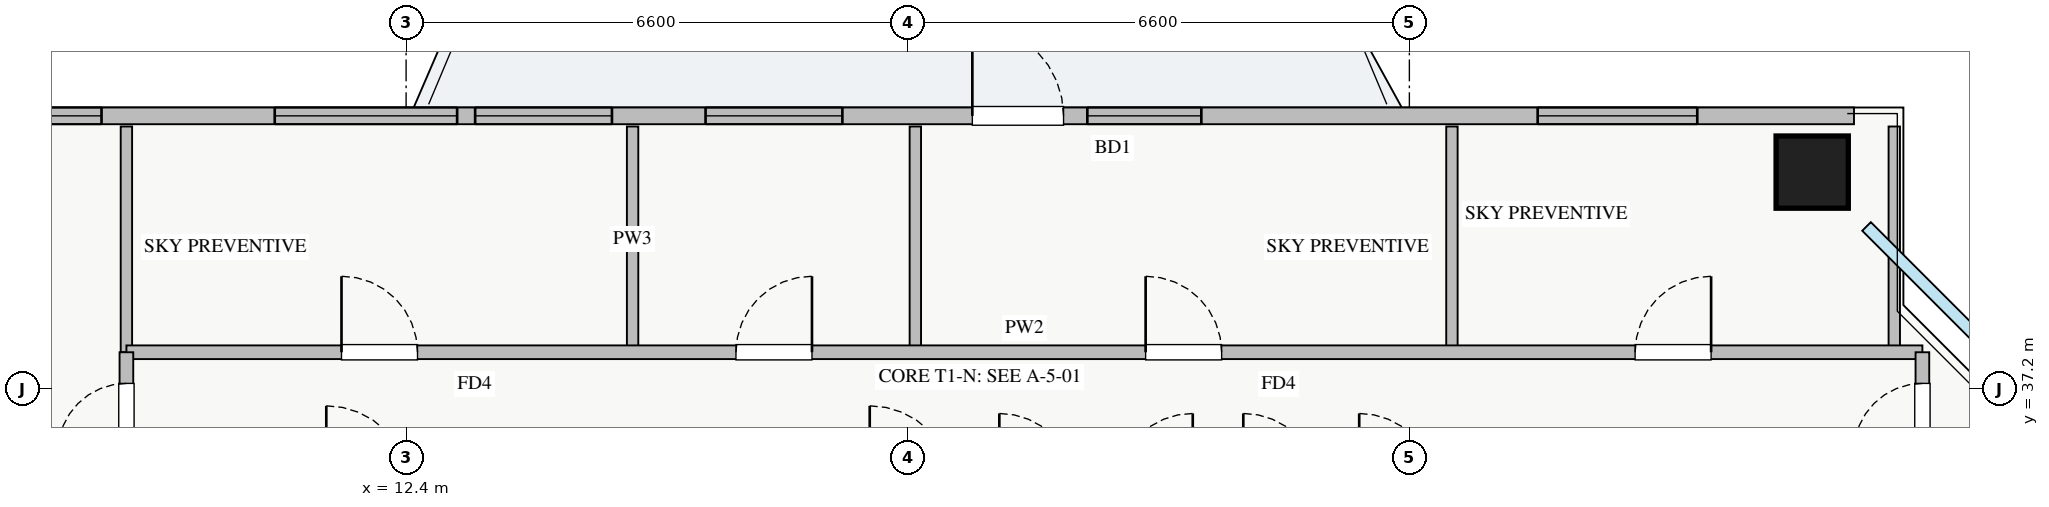
"""IFC4 building model, lengths in metres.
Left out: names, types, materials, properties, quantities, classifications, styles, units other than length and angle.
Written with IfcOpenShell. Run it as: python <this file> out.ifc"""

import sys

from ifc_helpers import new_model, si_unit, direction, frame, frame_2d, origin, origin_2d, place, context, subcontext, project, spatial, rectangle, extrude, source, transform, mapped, element, fill, save


model = new_model("IFC4")
c1 = context("Model", 3, precision=1e-05, world=origin(), true_north=direction((0.0, 1.0)))
c2 = subcontext(c1, "Body", "Model", "MODEL_VIEW")
j1 = project(units=[si_unit("LENGTHUNIT", "METRE"), si_unit("PLANEANGLEUNIT", "RADIAN")], contexts=[c1])
p1 = place(None, origin())
s1 = spatial("IfcSite", under=j1, at=p1, CompositionType="ELEMENT")
p2 = place(p1, origin())
s2 = spatial("IfcBuilding", under=s1, at=p2, CompositionType="ELEMENT")
p3 = place(p2, frame((0.0, 0.0, 182.75)))
s3 = spatial("IfcBuildingStorey", under=s2, at=p3, CompositionType="ELEMENT", Elevation=182.75)
m1 = source(origin(), c2, "Body", "SweptSolid", [
    extrude(rectangle(XDim=0.95, YDim=0.95, at=origin_2d()), origin(), (0.0, 0.0, 1.0), 3.25),
])
p4 = place(p3, frame((30.9, 40.05, 0.0), z_axis=(0.0, 0.0, 1.0), x_axis=(1.0, 0.0, 0.0)))
e1 = element("IfcColumn", 1, at=p4, inside=s3, PredefinedType="COLUMN", context=c2, shape_type="MappedRepresentation", body=[
    mapped(m1, transform((0.0, 0.0, 0.0), x_axis=(1.0, 0.0, 0.0), y_axis=(0.0, 1.0, 0.0), z_axis=(0.0, 0.0, 1.0), scale=1.0)),
])
p5 = place(p3, frame((6.55, 40.79, 0.0), z_axis=(0.0, 0.0, 1.0), x_axis=(1.0, 0.0, 0.0)))
e2 = element("IfcWall", 2, at=p5, inside=s3, PredefinedType="STANDARD", context=c2, shape_type="SweptSolid", body=[
    extrude(rectangle(XDim=24.9, YDim=0.22, at=frame_2d((12.45, 0.0))), origin(), (0.0, 0.0, 1.0), 2.57),
])
p6 = place(p5, frame((13.3, 0.0, 0.0)))
e3 = element("IfcOpeningElement", 3, at=p6, cuts=e2, PredefinedType="OPENING", context=c2, shape_type="SweptSolid", body=[
    extrude(rectangle(XDim=1.2, YDim=2.1, at=frame_2d((0.6, 1.05))), frame((0.0, 0.12, 0.0), z_axis=(0.0, -1.0, 0.0), x_axis=(1.0, 0.0, 0.0)), (0.0, 0.0, 1.0), 0.24),
])
p7 = place(p5, frame((0.343, 0.0, 0.9)))
e4 = element("IfcOpeningElement", 4, at=p7, cuts=e2, PredefinedType="OPENING", context=c2, shape_type="SweptSolid", body=[
    extrude(rectangle(XDim=1.5, YDim=1.5, at=frame_2d((0.75, 0.75))), frame((0.0, 0.12, 0.0), z_axis=(0.0, -1.0, 0.0), x_axis=(1.0, 0.0, 0.0)), (0.0, 0.0, 1.0), 0.24),
])
p8 = place(p5, frame((9.79, 0.0, 0.9)))
e5 = element("IfcOpeningElement", 5, at=p8, cuts=e2, PredefinedType="OPENING", context=c2, shape_type="SweptSolid", body=[
    extrude(rectangle(XDim=1.8, YDim=1.5, at=frame_2d((0.9, 0.75))), frame((0.0, 0.12, 0.0), z_axis=(0.0, -1.0, 0.0), x_axis=(1.0, 0.0, 0.0)), (0.0, 0.0, 1.0), 0.24),
])
p9 = place(p5, frame((14.813, 0.0, 0.9)))
e6 = element("IfcOpeningElement", 6, at=p9, cuts=e2, PredefinedType="OPENING", context=c2, shape_type="SweptSolid", body=[
    extrude(rectangle(XDim=1.5, YDim=1.45, at=frame_2d((0.75, 0.725))), frame((0.0, 0.12, 0.0), z_axis=(0.0, -1.0, 0.0), x_axis=(1.0, 0.0, 0.0)), (0.0, 0.0, 1.0), 0.24),
])
p10 = place(p5, frame((20.738, 0.0, 0.9)))
e7 = element("IfcOpeningElement", 7, at=p10, cuts=e2, PredefinedType="OPENING", context=c2, shape_type="SweptSolid", body=[
    extrude(rectangle(XDim=2.1, YDim=1.48, at=frame_2d((1.05, 0.74))), frame((0.0, 0.12, 0.0), z_axis=(0.0, -1.0, 0.0), x_axis=(1.0, 0.0, 0.0)), (0.0, 0.0, 1.0), 0.24),
])
p11 = place(p5, frame((4.122, 0.0, 0.9)))
e8 = element("IfcOpeningElement", 8, at=p11, cuts=e2, PredefinedType="OPENING", context=c2, shape_type="SweptSolid", body=[
    extrude(rectangle(XDim=2.4, YDim=1.5, at=frame_2d((1.2, 0.75))), frame((0.0, 0.12, 0.0), z_axis=(0.0, -1.0, 0.0), x_axis=(1.0, 0.0, 0.0)), (0.0, 0.0, 1.0), 0.24),
])
p12 = place(p5, frame((6.758, 0.0, 0.9)))
e9 = element("IfcOpeningElement", 9, at=p12, cuts=e2, PredefinedType="OPENING", context=c2, shape_type="SweptSolid", body=[
    extrude(rectangle(XDim=1.8, YDim=1.5, at=frame_2d((0.9, 0.75))), frame((0.0, 0.12, 0.0), z_axis=(0.0, -1.0, 0.0), x_axis=(1.0, 0.0, 0.0)), (0.0, 0.0, 1.0), 0.24),
])
p13 = place(p3, frame((15.38, 37.68, 0.0), z_axis=(0.0, 0.0, 1.0), x_axis=(0.0, 1.0, 0.0)))
e10 = element("IfcWall", 10, at=p13, inside=s3, PredefinedType="PARTITIONING", context=c2, shape_type="SweptSolid", body=[
    extrude(rectangle(XDim=2.97, YDim=0.15, at=frame_2d((1.485, 0.0))), origin(), (0.0, 0.0, 1.0), 3.03),
])
p14 = place(p3, frame((19.1, 37.68, 0.0), z_axis=(0.0, 0.0, 1.0), x_axis=(0.0, 1.0, 0.0)))
e11 = element("IfcWall", 11, at=p14, inside=s3, PredefinedType="PARTITIONING", context=c2, shape_type="SweptSolid", body=[
    extrude(rectangle(XDim=2.97, YDim=0.15, at=frame_2d((1.485, 0.0))), origin(), (0.0, 0.0, 1.0), 2.825),
])
for number, where, z_axis, x_axis in (
    (12, (26.16, 37.68, 0.0), (0.0, 0.0, 1.0), (0.0, 1.0, 0.0)),
    (13, (8.72, 37.68, 0.0), (0.0, 0.0, 1.0), (0.0, 1.0, 0.0)),
    (14, (31.98, 37.68, 0.0), (0.0, 0.0, 1.0), (0.0, 1.0, 0.0)),
):
    element("IfcWall", number, at=place(p3, frame(where, z_axis=z_axis, x_axis=x_axis)), inside=s3, PredefinedType="PARTITIONING", context=c2, shape_type="SweptSolid", body=[
        extrude(rectangle(XDim=2.97, YDim=0.15, at=frame_2d((1.485, 0.0))), origin(), (0.0, 0.0, 1.0), 3.03),
    ])
p15 = place(p3, frame((8.72, 37.68, 0.0), z_axis=(0.0, 0.0, 1.0), x_axis=(1.0, 0.0, 0.0)))
e15 = element("IfcWall", 15, at=p15, inside=s3, PredefinedType="PARTITIONING", context=c2, shape_type="SweptSolid", body=[
    extrude(rectangle(XDim=23.63, YDim=0.18, at=frame_2d((11.815, 0.0))), origin(), (0.0, 0.0, 1.0), 3.03),
])
p16 = place(p15, frame((2.83, 0.0, 0.0)))
e16 = element("IfcOpeningElement", 16, at=p16, cuts=e15, PredefinedType="OPENING", context=c2, shape_type="SweptSolid", body=[
    extrude(rectangle(XDim=1.0, YDim=2.05, at=frame_2d((0.5, 1.025))), frame((0.0, 0.1, 0.0), z_axis=(0.0, -1.0, 0.0), x_axis=(1.0, 0.0, 0.0)), (0.0, 0.0, 1.0), 0.2),
])
p17 = place(p15, frame((8.02, 0.0, 0.0)))
e17 = element("IfcOpeningElement", 17, at=p17, cuts=e15, PredefinedType="OPENING", context=c2, shape_type="SweptSolid", body=[
    extrude(rectangle(XDim=1.0, YDim=2.05, at=frame_2d((0.5, 1.025))), frame((0.0, 0.1, 0.0), z_axis=(0.0, -1.0, 0.0), x_axis=(1.0, 0.0, 0.0)), (0.0, 0.0, 1.0), 0.2),
])
p18 = place(p15, frame((13.41, 0.0, 0.0)))
e18 = element("IfcOpeningElement", 18, at=p18, cuts=e15, PredefinedType="OPENING", context=c2, shape_type="SweptSolid", body=[
    extrude(rectangle(XDim=1.0, YDim=2.05, at=frame_2d((0.5, 1.025))), frame((0.0, 0.1, 0.0), z_axis=(0.0, -1.0, 0.0), x_axis=(1.0, 0.0, 0.0)), (0.0, 0.0, 1.0), 0.2),
])
p19 = place(p15, frame((19.85, 0.0, 0.0)))
e19 = element("IfcOpeningElement", 19, at=p19, cuts=e15, PredefinedType="OPENING", context=c2, shape_type="SweptSolid", body=[
    extrude(rectangle(XDim=1.0, YDim=2.05, at=frame_2d((0.5, 1.025))), frame((0.0, 0.1, 0.0), z_axis=(0.0, -1.0, 0.0), x_axis=(1.0, 0.0, 0.0)), (0.0, 0.0, 1.0), 0.2),
])
p20 = place(p3, frame((8.72, 8.31, 0.0), z_axis=(0.0, 0.0, 1.0), x_axis=(0.0, 1.0, 0.0)))
e20 = element("IfcWall", 20, at=p20, inside=s3, PredefinedType="PARTITIONING", context=c2, shape_type="SweptSolid", body=[
    extrude(rectangle(XDim=29.37, YDim=0.18, at=frame_2d((14.685, 0.0))), origin(), (0.0, 0.0, 1.0), 3.03),
])
p21 = place(p20, frame((28.06, 0.0, 0.0)))
e21 = element("IfcOpeningElement", 21, at=p21, cuts=e20, PredefinedType="OPENING", context=c2, shape_type="SweptSolid", body=[
    extrude(rectangle(XDim=0.9, YDim=2.05, at=frame_2d((0.45, 1.025))), frame((0.0, 0.1, 0.0), z_axis=(0.0, -1.0, 0.0), x_axis=(1.0, 0.0, 0.0)), (0.0, 0.0, 1.0), 0.2),
])
p22 = place(p20, frame((0.24, 0.0, 0.0)))
e22 = element("IfcOpeningElement", 22, at=p22, cuts=e20, PredefinedType="OPENING", context=c2, shape_type="SweptSolid", body=[
    extrude(rectangle(XDim=0.9, YDim=2.05, at=frame_2d((0.45, 1.025))), frame((0.0, 0.1, 0.0), z_axis=(0.0, -1.0, 0.0), x_axis=(1.0, 0.0, 0.0)), (0.0, 0.0, 1.0), 0.2),
])
p23 = place(p20, frame((2.25, 0.0, 0.0)))
e23 = element("IfcOpeningElement", 23, at=p23, cuts=e20, PredefinedType="OPENING", context=c2, shape_type="SweptSolid", body=[
    extrude(rectangle(XDim=1.0, YDim=2.05, at=frame_2d((0.5, 1.025))), frame((0.0, 0.1, 0.0), z_axis=(0.0, -1.0, 0.0), x_axis=(1.0, 0.0, 0.0)), (0.0, 0.0, 1.0), 0.2),
])
p24 = place(p20, frame((7.935, 0.0, 0.0)))
e24 = element("IfcOpeningElement", 24, at=p24, cuts=e20, PredefinedType="OPENING", context=c2, shape_type="SweptSolid", body=[
    extrude(rectangle(XDim=1.0, YDim=2.05, at=frame_2d((0.5, 1.025))), frame((0.0, 0.1, 0.0), z_axis=(0.0, -1.0, 0.0), x_axis=(1.0, 0.0, 0.0)), (0.0, 0.0, 1.0), 0.2),
])
p25 = place(p20, frame((17.3, 0.0, 0.0)))
e25 = element("IfcOpeningElement", 25, at=p25, cuts=e20, PredefinedType="OPENING", context=c2, shape_type="SweptSolid", body=[
    extrude(rectangle(XDim=1.0, YDim=2.05, at=frame_2d((0.5, 1.025))), frame((0.0, 0.1, 0.0), z_axis=(0.0, -1.0, 0.0), x_axis=(1.0, 0.0, 0.0)), (0.0, 0.0, 1.0), 0.2),
])
p26 = place(p20, frame((21.98, 0.0, 0.0)))
e26 = element("IfcOpeningElement", 26, at=p26, cuts=e20, PredefinedType="OPENING", context=c2, shape_type="SweptSolid", body=[
    extrude(rectangle(XDim=1.0, YDim=2.05, at=frame_2d((0.5, 1.025))), frame((0.0, 0.1, 0.0), z_axis=(0.0, -1.0, 0.0), x_axis=(1.0, 0.0, 0.0)), (0.0, 0.0, 1.0), 0.2),
])
p27 = place(p3, frame((32.35, 8.31, 0.0), z_axis=(0.0, 0.0, 1.0), x_axis=(0.0, 1.0, 0.0)))
e27 = element("IfcWall", 27, at=p27, inside=s3, PredefinedType="PARTITIONING", context=c2, shape_type="SweptSolid", body=[
    extrude(rectangle(XDim=29.37, YDim=0.18, at=frame_2d((14.685, 0.0))), origin(), (0.0, 0.0, 1.0), 3.03),
])
p28 = place(p27, frame((28.06, 0.0, 0.0)))
e28 = element("IfcOpeningElement", 28, at=p28, cuts=e27, PredefinedType="OPENING", context=c2, shape_type="SweptSolid", body=[
    extrude(rectangle(XDim=0.9, YDim=2.05, at=frame_2d((0.45, 1.025))), frame((0.0, 0.1, 0.0), z_axis=(0.0, -1.0, 0.0), x_axis=(1.0, 0.0, 0.0)), (0.0, 0.0, 1.0), 0.2),
])
p29 = place(p27, frame((0.415, 0.0, 0.0)))
e29 = element("IfcOpeningElement", 29, at=p29, cuts=e27, PredefinedType="OPENING", context=c2, shape_type="SweptSolid", body=[
    extrude(rectangle(XDim=0.9, YDim=2.05, at=frame_2d((0.45, 1.025))), frame((0.0, 0.1, 0.0), z_axis=(0.0, -1.0, 0.0), x_axis=(1.0, 0.0, 0.0)), (0.0, 0.0, 1.0), 0.2),
])
p30 = place(p27, frame((3.58, 0.0, 0.0)))
e30 = element("IfcOpeningElement", 30, at=p30, cuts=e27, PredefinedType="OPENING", context=c2, shape_type="SweptSolid", body=[
    extrude(rectangle(XDim=1.0, YDim=2.05, at=frame_2d((0.5, 1.025))), frame((0.0, 0.1, 0.0), z_axis=(0.0, -1.0, 0.0), x_axis=(1.0, 0.0, 0.0)), (0.0, 0.0, 1.0), 0.2),
])
p31 = place(p27, frame((12.305, 0.0, 0.0)))
e31 = element("IfcOpeningElement", 31, at=p31, cuts=e27, PredefinedType="OPENING", context=c2, shape_type="SweptSolid", body=[
    extrude(rectangle(XDim=1.0, YDim=2.05, at=frame_2d((0.5, 1.025))), frame((0.0, 0.1, 0.0), z_axis=(0.0, -1.0, 0.0), x_axis=(1.0, 0.0, 0.0)), (0.0, 0.0, 1.0), 0.2),
])
p32 = place(p27, frame((20.835, 0.0, 0.0)))
e32 = element("IfcOpeningElement", 32, at=p32, cuts=e27, PredefinedType="OPENING", context=c2, shape_type="SweptSolid", body=[
    extrude(rectangle(XDim=1.0, YDim=2.05, at=frame_2d((0.5, 1.025))), frame((0.0, 0.1, 0.0), z_axis=(0.0, -1.0, 0.0), x_axis=(1.0, 0.0, 0.0)), (0.0, 0.0, 1.0), 0.2),
])
m2 = source(origin(), c2, "Body", "SweptSolid", [
    extrude(rectangle(XDim=1.2, YDim=2.1, at=frame_2d((0.6, 1.05))), frame((0.0, 0.025, 0.0), z_axis=(0.0, -1.0, 0.0), x_axis=(1.0, 0.0, 0.0)), (0.0, 0.0, 1.0), 0.05),
])
p33 = place(p6, origin())
e33 = element("IfcDoor", 33, at=p33, inside=s3, OperationType="SINGLE_SWING_LEFT", PredefinedType="DOOR", context=c2, shape_type="MappedRepresentation", body=[
    mapped(m2, transform((0.0, 0.0, 0.0), x_axis=(1.0, 0.0, 0.0), y_axis=(0.0, 1.0, 0.0), z_axis=(0.0, 0.0, 1.0), scale=1.0)),
])
fill(e3, e33)
m3 = source(origin(), c2, "Body", "SweptSolid", [
    extrude(rectangle(XDim=1.5, YDim=1.5, at=frame_2d((0.75, 0.75))), frame((0.0, 0.03, 0.0), z_axis=(0.0, -1.0, 0.0), x_axis=(1.0, 0.0, 0.0)), (0.0, 0.0, 1.0), 0.06),
])
p34 = place(p7, origin())
e34 = element("IfcWindow", 34, at=p34, inside=s3, PartitioningType="TRIPLE_PANEL_VERTICAL", PredefinedType="WINDOW", context=c2, shape_type="MappedRepresentation", body=[
    mapped(m3, transform((0.0, 0.0, 0.0), x_axis=(1.0, 0.0, 0.0), y_axis=(0.0, 1.0, 0.0), z_axis=(0.0, 0.0, 1.0), scale=1.0)),
])
fill(e4, e34)
m4 = source(origin(), c2, "Body", "SweptSolid", [
    extrude(rectangle(XDim=1.8, YDim=1.5, at=frame_2d((0.9, 0.75))), frame((0.0, 0.03, 0.0), z_axis=(0.0, -1.0, 0.0), x_axis=(1.0, 0.0, 0.0)), (0.0, 0.0, 1.0), 0.06),
])
p35 = place(p8, origin())
e35 = element("IfcWindow", 35, at=p35, inside=s3, PartitioningType="DOUBLE_PANEL_VERTICAL", PredefinedType="WINDOW", context=c2, shape_type="MappedRepresentation", body=[
    mapped(m4, transform((0.0, 0.0, 0.0), x_axis=(1.0, 0.0, 0.0), y_axis=(0.0, 1.0, 0.0), z_axis=(0.0, 0.0, 1.0), scale=1.0)),
])
fill(e5, e35)
m5 = source(origin(), c2, "Body", "SweptSolid", [
    extrude(rectangle(XDim=1.5, YDim=1.45, at=frame_2d((0.75, 0.725))), frame((0.0, 0.03, 0.0), z_axis=(0.0, -1.0, 0.0), x_axis=(1.0, 0.0, 0.0)), (0.0, 0.0, 1.0), 0.06),
])
p36 = place(p9, origin())
e36 = element("IfcWindow", 36, at=p36, inside=s3, PartitioningType="DOUBLE_PANEL_VERTICAL", PredefinedType="WINDOW", context=c2, shape_type="MappedRepresentation", body=[
    mapped(m5, transform((0.0, 0.0, 0.0), x_axis=(1.0, 0.0, 0.0), y_axis=(0.0, 1.0, 0.0), z_axis=(0.0, 0.0, 1.0), scale=1.0)),
])
fill(e6, e36)
m6 = source(origin(), c2, "Body", "SweptSolid", [
    extrude(rectangle(XDim=2.1, YDim=1.48, at=frame_2d((1.05, 0.74))), frame((0.0, 0.03, 0.0), z_axis=(0.0, -1.0, 0.0), x_axis=(1.0, 0.0, 0.0)), (0.0, 0.0, 1.0), 0.06),
])
p37 = place(p10, origin())
e37 = element("IfcWindow", 37, at=p37, inside=s3, PartitioningType="TRIPLE_PANEL_VERTICAL", PredefinedType="WINDOW", context=c2, shape_type="MappedRepresentation", body=[
    mapped(m6, transform((0.0, 0.0, 0.0), x_axis=(1.0, 0.0, 0.0), y_axis=(0.0, 1.0, 0.0), z_axis=(0.0, 0.0, 1.0), scale=1.0)),
])
fill(e7, e37)
m7 = source(origin(), c2, "Body", "SweptSolid", [
    extrude(rectangle(XDim=1.0, YDim=2.05, at=frame_2d((0.5, 1.025))), frame((0.0, 0.025, 0.0), z_axis=(0.0, -1.0, 0.0), x_axis=(1.0, 0.0, 0.0)), (0.0, 0.0, 1.0), 0.05),
])
p38 = place(p16, origin())
e38 = element("IfcDoor", 38, at=p38, inside=s3, OperationType="SINGLE_SWING_LEFT", PredefinedType="DOOR", context=c2, shape_type="MappedRepresentation", body=[
    mapped(m7, transform((0.0, 0.0, 0.0), x_axis=(1.0, 0.0, 0.0), y_axis=(0.0, 1.0, 0.0), z_axis=(0.0, 0.0, 1.0), scale=1.0)),
])
fill(e16, e38)
p39 = place(p17, origin())
e39 = element("IfcDoor", 39, at=p39, inside=s3, OperationType="SINGLE_SWING_RIGHT", PredefinedType="DOOR", context=c2, shape_type="MappedRepresentation", body=[
    mapped(m7, transform((0.0, 0.0, 0.0), x_axis=(1.0, 0.0, 0.0), y_axis=(0.0, 1.0, 0.0), z_axis=(0.0, 0.0, 1.0), scale=1.0)),
])
fill(e17, e39)
p40 = place(p18, origin())
e40 = element("IfcDoor", 40, at=p40, inside=s3, OperationType="SINGLE_SWING_LEFT", PredefinedType="DOOR", context=c2, shape_type="MappedRepresentation", body=[
    mapped(m7, transform((0.0, 0.0, 0.0), x_axis=(1.0, 0.0, 0.0), y_axis=(0.0, 1.0, 0.0), z_axis=(0.0, 0.0, 1.0), scale=1.0)),
])
fill(e18, e40)
p41 = place(p19, origin())
e41 = element("IfcDoor", 41, at=p41, inside=s3, OperationType="SINGLE_SWING_RIGHT", PredefinedType="DOOR", context=c2, shape_type="MappedRepresentation", body=[
    mapped(m7, transform((0.0, 0.0, 0.0), x_axis=(1.0, 0.0, 0.0), y_axis=(0.0, 1.0, 0.0), z_axis=(0.0, 0.0, 1.0), scale=1.0)),
])
fill(e19, e41)
m8 = source(origin(), c2, "Body", "SweptSolid", [
    extrude(rectangle(XDim=0.9, YDim=2.05, at=frame_2d((0.45, 1.025))), frame((0.0, 0.025, 0.0), z_axis=(0.0, -1.0, 0.0), x_axis=(1.0, 0.0, 0.0)), (0.0, 0.0, 1.0), 0.05),
])
p42 = place(p21, origin())
e42 = element("IfcDoor", 42, at=p42, inside=s3, OperationType="SINGLE_SWING_LEFT", PredefinedType="DOOR", context=c2, shape_type="MappedRepresentation", body=[
    mapped(m8, transform((0.0, 0.0, 0.0), x_axis=(1.0, 0.0, 0.0), y_axis=(0.0, 1.0, 0.0), z_axis=(0.0, 0.0, 1.0), scale=1.0)),
])
fill(e21, e42)
p43 = place(p28, origin())
e43 = element("IfcDoor", 43, at=p43, inside=s3, OperationType="SINGLE_SWING_LEFT", PredefinedType="DOOR", context=c2, shape_type="MappedRepresentation", body=[
    mapped(m8, transform((0.0, 0.0, 0.0), x_axis=(1.0, 0.0, 0.0), y_axis=(0.0, 1.0, 0.0), z_axis=(0.0, 0.0, 1.0), scale=1.0)),
])
fill(e28, e43)
m9 = source(origin(), c2, "Body", "SweptSolid", [
    extrude(rectangle(XDim=2.4, YDim=1.5, at=frame_2d((1.2, 0.75))), frame((0.0, 0.03, 0.0), z_axis=(0.0, -1.0, 0.0), x_axis=(1.0, 0.0, 0.0)), (0.0, 0.0, 1.0), 0.06),
])
p44 = place(p11, origin())
e44 = element("IfcWindow", 44, at=p44, inside=s3, PartitioningType="TRIPLE_PANEL_VERTICAL", PredefinedType="WINDOW", context=c2, shape_type="MappedRepresentation", body=[
    mapped(m9, transform((0.0, 0.0, 0.0), x_axis=(1.0, 0.0, 0.0), y_axis=(0.0, 1.0, 0.0), z_axis=(0.0, 0.0, 1.0), scale=1.0)),
])
fill(e8, e44)
p45 = place(p12, origin())
e45 = element("IfcWindow", 45, at=p45, inside=s3, PartitioningType="DOUBLE_PANEL_VERTICAL", PredefinedType="WINDOW", context=c2, shape_type="MappedRepresentation", body=[
    mapped(m4, transform((0.0, 0.0, 0.0), x_axis=(1.0, 0.0, 0.0), y_axis=(0.0, 1.0, 0.0), z_axis=(0.0, 0.0, 1.0), scale=1.0)),
])
fill(e9, e45)
save(model, sys.argv[1])
